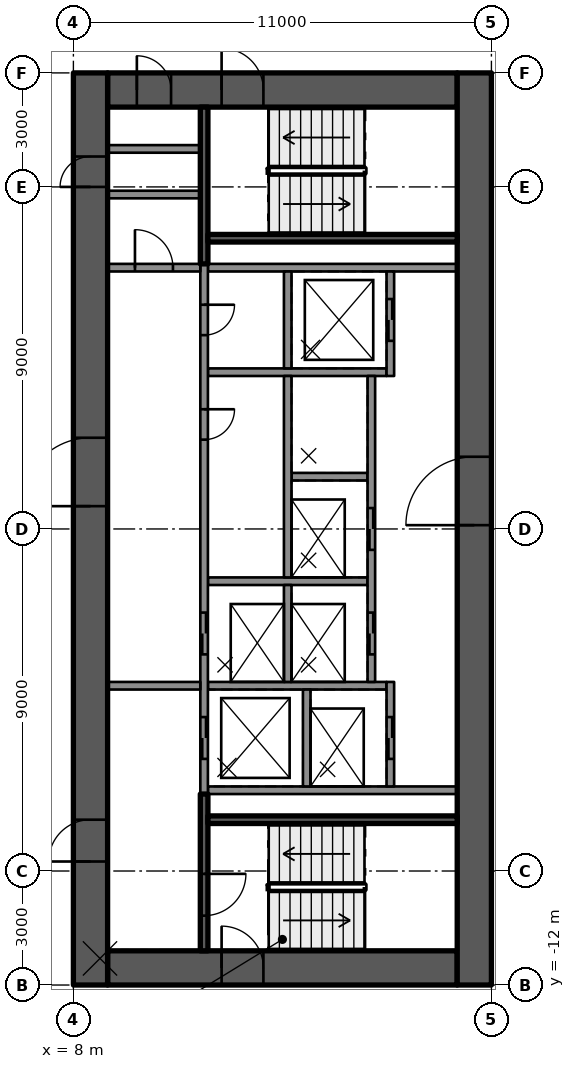
"""IFC4 building model, lengths in metres.
Left out: names, types, materials, properties, quantities, classifications, styles, units other than length and angle.
Written with IfcOpenShell. Run it as: python <this file> out.ifc"""

import sys

from ifc_helpers import new_model, si_unit, direction, frame, frame_2d, origin, place, context, subcontext, project, spatial, rectangle, extrude, element, fill, save


model = new_model("IFC4")
c1 = context("Model", 3, precision=1e-05, world=origin(), true_north=direction((0.0, 1.0)))
c2 = subcontext(c1, "Body", "Model", "MODEL_VIEW")
j1 = project(units=[si_unit("LENGTHUNIT", "METRE"), si_unit("PLANEANGLEUNIT", "RADIAN")], contexts=[c1])
p1 = place(None, origin())
s1 = spatial("IfcSite", under=j1, at=p1, CompositionType="ELEMENT")
p2 = place(p1, origin())
s2 = spatial("IfcBuilding", under=s1, at=p2, CompositionType="ELEMENT")
p3 = place(p2, frame((0.0, 0.0, 156.1)))
s3 = spatial("IfcBuildingStorey", under=s2, at=p3, CompositionType="ELEMENT", Elevation=156.1)
p4 = place(p3, frame((8.9, 11.55, 0.0), z_axis=(0.0, 0.0, 1.0), x_axis=(1.0, 0.0, 0.0)))
e1 = element("IfcWall", 1, at=p4, inside=s3, PredefinedType="SHEAR", context=c2, shape_type="SweptSolid", body=[
    extrude(rectangle(XDim=9.2, YDim=0.9, at=frame_2d((4.6, 0.0))), origin(), (0.0, 0.0, 1.0), 3.5),
])
p5 = place(p4, frame((3.0, 0.0, 0.0)))
e2 = element("IfcOpeningElement", 2, at=p5, cuts=e1, PredefinedType="OPENING", context=c2, shape_type="SweptSolid", body=[
    extrude(rectangle(XDim=1.1, YDim=2.1, at=frame_2d((0.55, 1.05))), frame((0.0, 0.46, 0.0), z_axis=(0.0, -1.0, 0.0), x_axis=(1.0, 0.0, 0.0)), (0.0, 0.0, 1.0), 0.92),
])
p6 = place(p4, frame((0.77, 0.0, 0.0)))
e3 = element("IfcOpeningElement", 3, at=p6, cuts=e1, PredefinedType="OPENING", context=c2, shape_type="SweptSolid", body=[
    extrude(rectangle(XDim=0.9, YDim=2.1, at=frame_2d((0.45, 1.05))), frame((0.0, 0.46, 0.0), z_axis=(0.0, -1.0, 0.0), x_axis=(1.0, 0.0, 0.0)), (0.0, 0.0, 1.0), 0.92),
])
p7 = place(p3, frame((8.9, -11.55, 0.0), z_axis=(0.0, 0.0, 1.0), x_axis=(1.0, 0.0, 0.0)))
e4 = element("IfcWall", 4, at=p7, inside=s3, PredefinedType="SHEAR", context=c2, shape_type="SweptSolid", body=[
    extrude(rectangle(XDim=9.2, YDim=0.9, at=frame_2d((4.6, 0.0))), origin(), (0.0, 0.0, 1.0), 3.5),
])
p8 = place(p7, frame((3.0, 0.0, 0.0)))
e5 = element("IfcOpeningElement", 5, at=p8, cuts=e4, PredefinedType="OPENING", context=c2, shape_type="SweptSolid", body=[
    extrude(rectangle(XDim=1.1, YDim=2.1, at=frame_2d((0.55, 1.05))), frame((0.0, 0.46, 0.0), z_axis=(0.0, -1.0, 0.0), x_axis=(1.0, 0.0, 0.0)), (0.0, 0.0, 1.0), 0.92),
])
p9 = place(p3, frame((8.45, -12.0, 0.0), z_axis=(0.0, 0.0, 1.0), x_axis=(0.0, 1.0, 0.0)))
e6 = element("IfcWall", 6, at=p9, inside=s3, PredefinedType="SHEAR", context=c2, shape_type="SweptSolid", body=[
    extrude(rectangle(XDim=24.0, YDim=0.9, at=frame_2d((12.0, 0.0))), origin(), (0.0, 0.0, 1.0), 3.5),
])
p10 = place(p9, frame((12.6, 0.0, 0.0)))
e7 = element("IfcOpeningElement", 7, at=p10, cuts=e6, PredefinedType="OPENING", context=c2, shape_type="SweptSolid", body=[
    extrude(rectangle(XDim=1.8, YDim=2.1, at=frame_2d((0.9, 1.05))), frame((0.0, 0.46, 0.0), z_axis=(0.0, -1.0, 0.0), x_axis=(1.0, 0.0, 0.0)), (0.0, 0.0, 1.0), 0.92),
])
p11 = place(p9, frame((3.25, 0.0, 0.0)))
e8 = element("IfcOpeningElement", 8, at=p11, cuts=e6, PredefinedType="OPENING", context=c2, shape_type="SweptSolid", body=[
    extrude(rectangle(XDim=1.1, YDim=2.1, at=frame_2d((0.55, 1.05))), frame((0.0, 0.46, 0.0), z_axis=(0.0, -1.0, 0.0), x_axis=(1.0, 0.0, 0.0)), (0.0, 0.0, 1.0), 0.92),
])
p12 = place(p9, frame((21.0, 0.0, 0.0)))
e9 = element("IfcOpeningElement", 9, at=p12, cuts=e6, PredefinedType="OPENING", context=c2, shape_type="SweptSolid", body=[
    extrude(rectangle(XDim=0.8, YDim=2.1, at=frame_2d((0.4, 1.05))), frame((0.0, 0.46, 0.0), z_axis=(0.0, -1.0, 0.0), x_axis=(1.0, 0.0, 0.0)), (0.0, 0.0, 1.0), 0.92),
])
p13 = place(p3, frame((18.55, -12.0, 0.0), z_axis=(0.0, 0.0, 1.0), x_axis=(0.0, 1.0, 0.0)))
e10 = element("IfcWall", 10, at=p13, inside=s3, PredefinedType="SHEAR", context=c2, shape_type="SweptSolid", body=[
    extrude(rectangle(XDim=24.0, YDim=0.9, at=frame_2d((12.0, 0.0))), origin(), (0.0, 0.0, 1.0), 3.5),
])
p14 = place(p13, frame((12.1, 0.0, 0.0)))
e11 = element("IfcOpeningElement", 11, at=p14, cuts=e10, PredefinedType="OPENING", context=c2, shape_type="SweptSolid", body=[
    extrude(rectangle(XDim=1.8, YDim=2.1, at=frame_2d((0.9, 1.05))), frame((0.0, 0.46, 0.0), z_axis=(0.0, -1.0, 0.0), x_axis=(1.0, 0.0, 0.0)), (0.0, 0.0, 1.0), 0.92),
])
for number, where, z_axis, x_axis in (
    (12, (11.54, -6.875, 0.0), (0.0, 0.0, 1.0), (1.0, 0.0, 0.0)),
    (13, (11.54, 6.875, 0.0), (0.0, 0.0, 1.0), (1.0, 0.0, 0.0)),
):
    element("IfcWall", number, at=place(p3, frame(where, z_axis=z_axis, x_axis=x_axis)), inside=s3, PredefinedType="SOLIDWALL", context=c2, shape_type="SweptSolid", body=[
        extrude(rectangle(XDim=6.56, YDim=0.2, at=frame_2d((3.28, 0.0))), origin(), (0.0, 0.0, 1.0), 3.09),
    ])
p15 = place(p3, frame((11.54, 4.125, 0.0), z_axis=(0.0, 0.0, 1.0), x_axis=(1.0, 0.0, 0.0)))
e14 = element("IfcWall", 14, at=p15, inside=s3, PredefinedType="SOLIDWALL", context=c2, shape_type="SweptSolid", body=[
    extrude(rectangle(XDim=4.7, YDim=0.2, at=frame_2d((2.35, 0.0))), origin(), (0.0, 0.0, 1.0), 3.09),
])
p16 = place(p3, frame((13.74, 1.375, 0.0), z_axis=(0.0, 0.0, 1.0), x_axis=(1.0, 0.0, 0.0)))
e15 = element("IfcWall", 15, at=p16, inside=s3, PredefinedType="SOLIDWALL", context=c2, shape_type="SweptSolid", body=[
    extrude(rectangle(XDim=2.0, YDim=0.2, at=frame_2d((1.0, 0.0))), origin(), (0.0, 0.0, 1.0), 3.09),
])
p17 = place(p3, frame((11.54, -1.375, 0.0), z_axis=(0.0, 0.0, 1.0), x_axis=(1.0, 0.0, 0.0)))
e16 = element("IfcWall", 16, at=p17, inside=s3, PredefinedType="SOLIDWALL", context=c2, shape_type="SweptSolid", body=[
    extrude(rectangle(XDim=4.2, YDim=0.2, at=frame_2d((2.1, 0.0))), origin(), (0.0, 0.0, 1.0), 3.09),
])
p18 = place(p3, frame((11.54, -4.125, 0.0), z_axis=(0.0, 0.0, 1.0), x_axis=(1.0, 0.0, 0.0)))
e17 = element("IfcWall", 17, at=p18, inside=s3, PredefinedType="SOLIDWALL", context=c2, shape_type="SweptSolid", body=[
    extrude(rectangle(XDim=4.7, YDim=0.2, at=frame_2d((2.35, 0.0))), origin(), (0.0, 0.0, 1.0), 3.09),
])
p19 = place(p3, frame((11.44, 6.975, 0.0), z_axis=(0.0, 0.0, 1.0), x_axis=(0.0, -1.0, 0.0)))
e18 = element("IfcWall", 18, at=p19, inside=s3, PredefinedType="SOLIDWALL", context=c2, shape_type="SweptSolid", body=[
    extrude(rectangle(XDim=13.95, YDim=0.2, at=frame_2d((6.975, 0.0))), origin(), (0.0, 0.0, 1.0), 3.09),
])
p20 = place(p19, frame((9.175, 0.0, 0.0)))
e19 = element("IfcOpeningElement", 19, at=p20, cuts=e18, PredefinedType="OPENING", context=c2, shape_type="SweptSolid", body=[
    extrude(rectangle(XDim=1.1, YDim=2.1, at=frame_2d((0.55, 1.05))), frame((0.0, 0.11, 0.0), z_axis=(0.0, -1.0, 0.0), x_axis=(1.0, 0.0, 0.0)), (0.0, 0.0, 1.0), 0.22),
])
p21 = place(p19, frame((11.925, 0.0, 0.0)))
e20 = element("IfcOpeningElement", 20, at=p21, cuts=e18, PredefinedType="OPENING", context=c2, shape_type="SweptSolid", body=[
    extrude(rectangle(XDim=1.1, YDim=2.1, at=frame_2d((0.55, 1.05))), frame((0.0, 0.11, 0.0), z_axis=(0.0, -1.0, 0.0), x_axis=(1.0, 0.0, 0.0)), (0.0, 0.0, 1.0), 0.22),
])
p22 = place(p19, frame((1.075, 0.0, 0.0)))
e21 = element("IfcOpeningElement", 21, at=p22, cuts=e18, PredefinedType="OPENING", context=c2, shape_type="SweptSolid", body=[
    extrude(rectangle(XDim=0.8, YDim=2.1, at=frame_2d((0.4, 1.05))), frame((0.0, 0.11, 0.0), z_axis=(0.0, -1.0, 0.0), x_axis=(1.0, 0.0, 0.0)), (0.0, 0.0, 1.0), 0.22),
])
p23 = place(p19, frame((3.825, 0.0, 0.0)))
e22 = element("IfcOpeningElement", 22, at=p23, cuts=e18, PredefinedType="OPENING", context=c2, shape_type="SweptSolid", body=[
    extrude(rectangle(XDim=0.8, YDim=2.1, at=frame_2d((0.4, 1.05))), frame((0.0, 0.11, 0.0), z_axis=(0.0, -1.0, 0.0), x_axis=(1.0, 0.0, 0.0)), (0.0, 0.0, 1.0), 0.22),
])
p24 = place(p3, frame((13.64, 6.775, 0.0), z_axis=(0.0, 0.0, 1.0), x_axis=(0.0, -1.0, 0.0)))
e23 = element("IfcWall", 23, at=p24, inside=s3, PredefinedType="SOLIDWALL", context=c2, shape_type="SweptSolid", body=[
    extrude(rectangle(XDim=2.55, YDim=0.2, at=frame_2d((1.275, 0.0))), origin(), (0.0, 0.0, 1.0), 3.09),
])
p25 = place(p3, frame((13.64, 4.025, 0.0), z_axis=(0.0, 0.0, 1.0), x_axis=(0.0, -1.0, 0.0)))
e24 = element("IfcWall", 24, at=p25, inside=s3, PredefinedType="SOLIDWALL", context=c2, shape_type="SweptSolid", body=[
    extrude(rectangle(XDim=5.3, YDim=0.2, at=frame_2d((2.65, 0.0))), origin(), (0.0, 0.0, 1.0), 3.09),
])
for number, where, z_axis, x_axis in (
    (25, (13.64, -1.475, 0.0), (0.0, 0.0, 1.0), (0.0, -1.0, 0.0)),
    (26, (14.14, -4.225, 0.0), (0.0, 0.0, 1.0), (0.0, -1.0, 0.0)),
):
    element("IfcWall", number, at=place(p3, frame(where, z_axis=z_axis, x_axis=x_axis)), inside=s3, PredefinedType="SOLIDWALL", context=c2, shape_type="SweptSolid", body=[
        extrude(rectangle(XDim=2.55, YDim=0.2, at=frame_2d((1.275, 0.0))), origin(), (0.0, 0.0, 1.0), 3.09),
    ])
p26 = place(p3, frame((16.34, 6.775, 0.0), z_axis=(0.0, 0.0, 1.0), x_axis=(0.0, -1.0, 0.0)))
e27 = element("IfcWall", 27, at=p26, inside=s3, PredefinedType="SOLIDWALL", context=c2, shape_type="SweptSolid", body=[
    extrude(rectangle(XDim=2.75, YDim=0.2, at=frame_2d((1.375, 0.0))), origin(), (0.0, 0.0, 1.0), 3.09),
])
p27 = place(p26, frame((0.725, 0.0, 0.0)))
e28 = element("IfcOpeningElement", 28, at=p27, cuts=e27, PredefinedType="OPENING", context=c2, shape_type="SweptSolid", body=[
    extrude(rectangle(XDim=1.1, YDim=2.1, at=frame_2d((0.55, 1.05))), frame((0.0, 0.11, 0.0), z_axis=(0.0, -1.0, 0.0), x_axis=(1.0, 0.0, 0.0)), (0.0, 0.0, 1.0), 0.22),
])
p28 = place(p3, frame((15.84, 4.025, 0.0), z_axis=(0.0, 0.0, 1.0), x_axis=(0.0, -1.0, 0.0)))
e29 = element("IfcWall", 29, at=p28, inside=s3, PredefinedType="SOLIDWALL", context=c2, shape_type="SweptSolid", body=[
    extrude(rectangle(XDim=8.05, YDim=0.2, at=frame_2d((4.025, 0.0))), origin(), (0.0, 0.0, 1.0), 3.09),
])
p29 = place(p28, frame((3.475, 0.0, 0.0)))
e30 = element("IfcOpeningElement", 30, at=p29, cuts=e29, PredefinedType="OPENING", context=c2, shape_type="SweptSolid", body=[
    extrude(rectangle(XDim=1.1, YDim=2.1, at=frame_2d((0.55, 1.05))), frame((0.0, 0.11, 0.0), z_axis=(0.0, -1.0, 0.0), x_axis=(1.0, 0.0, 0.0)), (0.0, 0.0, 1.0), 0.22),
])
p30 = place(p28, frame((6.225, 0.0, 0.0)))
e31 = element("IfcOpeningElement", 31, at=p30, cuts=e29, PredefinedType="OPENING", context=c2, shape_type="SweptSolid", body=[
    extrude(rectangle(XDim=1.1, YDim=2.1, at=frame_2d((0.55, 1.05))), frame((0.0, 0.11, 0.0), z_axis=(0.0, -1.0, 0.0), x_axis=(1.0, 0.0, 0.0)), (0.0, 0.0, 1.0), 0.22),
])
p31 = place(p3, frame((16.34, -4.025, 0.0), z_axis=(0.0, 0.0, 1.0), x_axis=(0.0, -1.0, 0.0)))
e32 = element("IfcWall", 32, at=p31, inside=s3, PredefinedType="SOLIDWALL", context=c2, shape_type="SweptSolid", body=[
    extrude(rectangle(XDim=2.75, YDim=0.2, at=frame_2d((1.375, 0.0))), origin(), (0.0, 0.0, 1.0), 3.09),
])
p32 = place(p31, frame((0.925, 0.0, 0.0)))
e33 = element("IfcOpeningElement", 33, at=p32, cuts=e32, PredefinedType="OPENING", context=c2, shape_type="SweptSolid", body=[
    extrude(rectangle(XDim=1.1, YDim=2.1, at=frame_2d((0.55, 1.05))), frame((0.0, 0.11, 0.0), z_axis=(0.0, -1.0, 0.0), x_axis=(1.0, 0.0, 0.0)), (0.0, 0.0, 1.0), 0.22),
])
p33 = place(p3, frame((11.44, -6.975, 0.0), z_axis=(0.0, 0.0, 1.0), x_axis=(0.0, -1.0, 0.0)))
e34 = element("IfcWall", 34, at=p33, inside=s3, PredefinedType="SOLIDWALL", context=c2, shape_type="SweptSolid", body=[
    extrude(rectangle(XDim=4.125, YDim=0.2, at=frame_2d((2.062, 0.0))), origin(), (0.0, 0.0, 1.0), 3.09),
])
p34 = place(p33, frame((2.1, 0.0, 0.0)))
e35 = element("IfcOpeningElement", 35, at=p34, cuts=e34, PredefinedType="OPENING", context=c2, shape_type="SweptSolid", body=[
    extrude(rectangle(XDim=1.1, YDim=2.1, at=frame_2d((0.55, 1.05))), frame((0.0, 0.11, 0.0), z_axis=(0.0, -1.0, 0.0), x_axis=(1.0, 0.0, 0.0)), (0.0, 0.0, 1.0), 0.22),
])
p35 = place(p3, frame((11.54, -7.65, 0.0), z_axis=(0.0, 0.0, 1.0), x_axis=(1.0, 0.0, 0.0)))
e36 = element("IfcWall", 36, at=p35, inside=s3, PredefinedType="SOLIDWALL", context=c2, shape_type="SweptSolid", body=[
    extrude(rectangle(XDim=6.56, YDim=0.2, at=frame_2d((3.28, 0.0))), origin(), (0.0, 0.0, 1.0), 3.09),
])
p36 = place(p3, frame((11.44, 11.1, 0.0), z_axis=(0.0, 0.0, 1.0), x_axis=(0.0, -1.0, 0.0)))
e37 = element("IfcWall", 37, at=p36, inside=s3, PredefinedType="SOLIDWALL", context=c2, shape_type="SweptSolid", body=[
    extrude(rectangle(XDim=4.125, YDim=0.2, at=frame_2d((2.062, 0.0))), origin(), (0.0, 0.0, 1.0), 3.09),
])
p37 = place(p3, frame((11.54, 7.65, 0.0), z_axis=(0.0, 0.0, 1.0), x_axis=(1.0, 0.0, 0.0)))
e38 = element("IfcWall", 38, at=p37, inside=s3, PredefinedType="SOLIDWALL", context=c2, shape_type="SweptSolid", body=[
    extrude(rectangle(XDim=6.56, YDim=0.2, at=frame_2d((3.28, 0.0))), origin(), (0.0, 0.0, 1.0), 3.09),
])
p38 = place(p3, frame((8.9, -4.125, 0.0), z_axis=(0.0, 0.0, 1.0), x_axis=(1.0, 0.0, 0.0)))
e39 = element("IfcWall", 39, at=p38, inside=s3, PredefinedType="PARTITIONING", context=c2, shape_type="SweptSolid", body=[
    extrude(rectangle(XDim=2.44, YDim=0.2, at=frame_2d((1.22, 0.0))), origin(), (0.0, 0.0, 1.0), 3.09),
])
p39 = place(p3, frame((8.9, 6.875, 0.0), z_axis=(0.0, 0.0, 1.0), x_axis=(1.0, 0.0, 0.0)))
e40 = element("IfcWall", 40, at=p39, inside=s3, PredefinedType="PARTITIONING", context=c2, shape_type="SweptSolid", body=[
    extrude(rectangle(XDim=2.44, YDim=0.2, at=frame_2d((1.22, 0.0))), origin(), (0.0, 0.0, 1.0), 3.09),
])
p40 = place(p39, frame((0.72, 0.0, 0.0)))
e41 = element("IfcOpeningElement", 41, at=p40, cuts=e40, PredefinedType="OPENING", context=c2, shape_type="SweptSolid", body=[
    extrude(rectangle(XDim=1.0, YDim=2.1, at=frame_2d((0.5, 1.05))), frame((0.0, 0.11, 0.0), z_axis=(0.0, -1.0, 0.0), x_axis=(1.0, 0.0, 0.0)), (0.0, 0.0, 1.0), 0.22),
])
for number, where, z_axis, x_axis in (
    (42, (8.9, 10.0, 0.0), (0.0, 0.0, 1.0), (1.0, 0.0, 0.0)),
    (43, (8.9, 8.8, 0.0), (0.0, 0.0, 1.0), (1.0, 0.0, 0.0)),
):
    element("IfcWall", number, at=place(p3, frame(where, z_axis=z_axis, x_axis=x_axis)), inside=s3, PredefinedType="PARTITIONING", context=c2, shape_type="SweptSolid", body=[
        extrude(rectangle(XDim=2.44, YDim=0.2, at=frame_2d((1.22, 0.0))), origin(), (0.0, 0.0, 1.0), 3.09),
    ])
p41 = place(p27, origin())
e44 = element("IfcDoor", 44, at=p41, inside=s3, OperationType="DOUBLE_DOOR_SLIDING", PredefinedType="DOOR", context=c2, shape_type="SweptSolid", body=[
    extrude(rectangle(XDim=1.1, YDim=2.1, at=frame_2d((0.55, 1.05))), frame((0.0, 0.025, 0.0), z_axis=(0.0, -1.0, 0.0), x_axis=(1.0, 0.0, 0.0)), (0.0, 0.0, 1.0), 0.05),
])
fill(e28, e44)
p42 = place(p29, origin())
e45 = element("IfcDoor", 45, at=p42, inside=s3, OperationType="DOUBLE_DOOR_SLIDING", PredefinedType="DOOR", context=c2, shape_type="SweptSolid", body=[
    extrude(rectangle(XDim=1.1, YDim=2.1, at=frame_2d((0.55, 1.05))), frame((0.0, 0.025, 0.0), z_axis=(0.0, -1.0, 0.0), x_axis=(1.0, 0.0, 0.0)), (0.0, 0.0, 1.0), 0.05),
])
fill(e30, e45)
p43 = place(p20, origin())
e46 = element("IfcDoor", 46, at=p43, inside=s3, OperationType="DOUBLE_DOOR_SLIDING", PredefinedType="DOOR", context=c2, shape_type="SweptSolid", body=[
    extrude(rectangle(XDim=1.1, YDim=2.1, at=frame_2d((0.55, 1.05))), frame((0.0, 0.025, 0.0), z_axis=(0.0, -1.0, 0.0), x_axis=(1.0, 0.0, 0.0)), (0.0, 0.0, 1.0), 0.05),
])
fill(e19, e46)
p44 = place(p30, origin())
e47 = element("IfcDoor", 47, at=p44, inside=s3, OperationType="DOUBLE_DOOR_SLIDING", PredefinedType="DOOR", context=c2, shape_type="SweptSolid", body=[
    extrude(rectangle(XDim=1.1, YDim=2.1, at=frame_2d((0.55, 1.05))), frame((0.0, 0.025, 0.0), z_axis=(0.0, -1.0, 0.0), x_axis=(1.0, 0.0, 0.0)), (0.0, 0.0, 1.0), 0.05),
])
fill(e31, e47)
p45 = place(p21, origin())
e48 = element("IfcDoor", 48, at=p45, inside=s3, OperationType="DOUBLE_DOOR_SLIDING", PredefinedType="DOOR", context=c2, shape_type="SweptSolid", body=[
    extrude(rectangle(XDim=1.1, YDim=2.1, at=frame_2d((0.55, 1.05))), frame((0.0, 0.025, 0.0), z_axis=(0.0, -1.0, 0.0), x_axis=(1.0, 0.0, 0.0)), (0.0, 0.0, 1.0), 0.05),
])
fill(e20, e48)
p46 = place(p32, origin())
e49 = element("IfcDoor", 49, at=p46, inside=s3, OperationType="DOUBLE_DOOR_SLIDING", PredefinedType="DOOR", context=c2, shape_type="SweptSolid", body=[
    extrude(rectangle(XDim=1.1, YDim=2.1, at=frame_2d((0.55, 1.05))), frame((0.0, 0.025, 0.0), z_axis=(0.0, -1.0, 0.0), x_axis=(1.0, 0.0, 0.0)), (0.0, 0.0, 1.0), 0.05),
])
fill(e33, e49)
p47 = place(p22, origin())
e50 = element("IfcDoor", 50, at=p47, inside=s3, OperationType="SINGLE_SWING_LEFT", PredefinedType="DOOR", context=c2, shape_type="SweptSolid", body=[
    extrude(rectangle(XDim=0.8, YDim=2.1, at=frame_2d((0.4, 1.05))), frame((0.0, 0.025, 0.0), z_axis=(0.0, -1.0, 0.0), x_axis=(1.0, 0.0, 0.0)), (0.0, 0.0, 1.0), 0.05),
])
fill(e21, e50)
p48 = place(p23, origin())
e51 = element("IfcDoor", 51, at=p48, inside=s3, OperationType="SINGLE_SWING_LEFT", PredefinedType="DOOR", context=c2, shape_type="SweptSolid", body=[
    extrude(rectangle(XDim=0.8, YDim=2.1, at=frame_2d((0.4, 1.05))), frame((0.0, 0.025, 0.0), z_axis=(0.0, -1.0, 0.0), x_axis=(1.0, 0.0, 0.0)), (0.0, 0.0, 1.0), 0.05),
])
fill(e22, e51)
p49 = place(p10, origin())
e52 = element("IfcDoor", 52, at=p49, inside=s3, OperationType="SINGLE_SWING_RIGHT", PredefinedType="DOOR", context=c2, shape_type="SweptSolid", body=[
    extrude(rectangle(XDim=1.8, YDim=2.1, at=frame_2d((0.9, 1.05))), frame((0.0, 0.025, 0.0), z_axis=(0.0, -1.0, 0.0), x_axis=(1.0, 0.0, 0.0)), (0.0, 0.0, 1.0), 0.05),
])
fill(e7, e52)
p50 = place(p14, origin())
e53 = element("IfcDoor", 53, at=p50, inside=s3, OperationType="SINGLE_SWING_RIGHT", PredefinedType="DOOR", context=c2, shape_type="SweptSolid", body=[
    extrude(rectangle(XDim=1.8, YDim=2.1, at=frame_2d((0.9, 1.05))), frame((0.0, 0.025, 0.0), z_axis=(0.0, -1.0, 0.0), x_axis=(1.0, 0.0, 0.0)), (0.0, 0.0, 1.0), 0.05),
])
fill(e11, e53)
p51 = place(p11, origin())
e54 = element("IfcDoor", 54, at=p51, inside=s3, OperationType="SINGLE_SWING_LEFT", PredefinedType="DOOR", context=c2, shape_type="SweptSolid", body=[
    extrude(rectangle(XDim=1.1, YDim=2.1, at=frame_2d((0.55, 1.05))), frame((0.0, 0.025, 0.0), z_axis=(0.0, -1.0, 0.0), x_axis=(1.0, 0.0, 0.0)), (0.0, 0.0, 1.0), 0.05),
])
fill(e8, e54)
p52 = place(p8, origin())
e55 = element("IfcDoor", 55, at=p52, inside=s3, OperationType="SINGLE_SWING_LEFT", PredefinedType="DOOR", context=c2, shape_type="SweptSolid", body=[
    extrude(rectangle(XDim=1.1, YDim=2.1, at=frame_2d((0.55, 1.05))), frame((0.0, 0.025, 0.0), z_axis=(0.0, -1.0, 0.0), x_axis=(1.0, 0.0, 0.0)), (0.0, 0.0, 1.0), 0.05),
])
fill(e5, e55)
p53 = place(p5, origin())
e56 = element("IfcDoor", 56, at=p53, inside=s3, OperationType="SINGLE_SWING_LEFT", PredefinedType="DOOR", context=c2, shape_type="SweptSolid", body=[
    extrude(rectangle(XDim=1.1, YDim=2.1, at=frame_2d((0.55, 1.05))), frame((0.0, 0.025, 0.0), z_axis=(0.0, -1.0, 0.0), x_axis=(1.0, 0.0, 0.0)), (0.0, 0.0, 1.0), 0.05),
])
fill(e2, e56)
p54 = place(p34, origin())
e57 = element("IfcDoor", 57, at=p54, inside=s3, OperationType="SINGLE_SWING_RIGHT", PredefinedType="DOOR", context=c2, shape_type="SweptSolid", body=[
    extrude(rectangle(XDim=1.1, YDim=2.1, at=frame_2d((0.55, 1.05))), frame((0.0, 0.025, 0.0), z_axis=(0.0, -1.0, 0.0), x_axis=(1.0, 0.0, 0.0)), (0.0, 0.0, 1.0), 0.05),
])
fill(e35, e57)
p55 = place(p6, origin())
e58 = element("IfcDoor", 58, at=p55, inside=s3, OperationType="SINGLE_SWING_LEFT", PredefinedType="DOOR", context=c2, shape_type="SweptSolid", body=[
    extrude(rectangle(XDim=0.9, YDim=2.1, at=frame_2d((0.45, 1.05))), frame((0.0, 0.025, 0.0), z_axis=(0.0, -1.0, 0.0), x_axis=(1.0, 0.0, 0.0)), (0.0, 0.0, 1.0), 0.05),
])
fill(e3, e58)
p56 = place(p12, origin())
e59 = element("IfcDoor", 59, at=p56, inside=s3, OperationType="SINGLE_SWING_RIGHT", PredefinedType="DOOR", context=c2, shape_type="SweptSolid", body=[
    extrude(rectangle(XDim=0.8, YDim=2.1, at=frame_2d((0.4, 1.05))), frame((0.0, 0.025, 0.0), z_axis=(0.0, -1.0, 0.0), x_axis=(1.0, 0.0, 0.0)), (0.0, 0.0, 1.0), 0.05),
])
fill(e9, e59)
p57 = place(p40, origin())
e60 = element("IfcDoor", 60, at=p57, inside=s3, OperationType="SINGLE_SWING_RIGHT", PredefinedType="DOOR", context=c2, shape_type="SweptSolid", body=[
    extrude(rectangle(XDim=1.0, YDim=2.1, at=frame_2d((0.5, 1.05))), frame((0.0, 0.025, 0.0), z_axis=(0.0, -1.0, 0.0), x_axis=(1.0, 0.0, 0.0)), (0.0, 0.0, 1.0), 0.05),
])
fill(e41, e60)
save(model, sys.argv[1])
